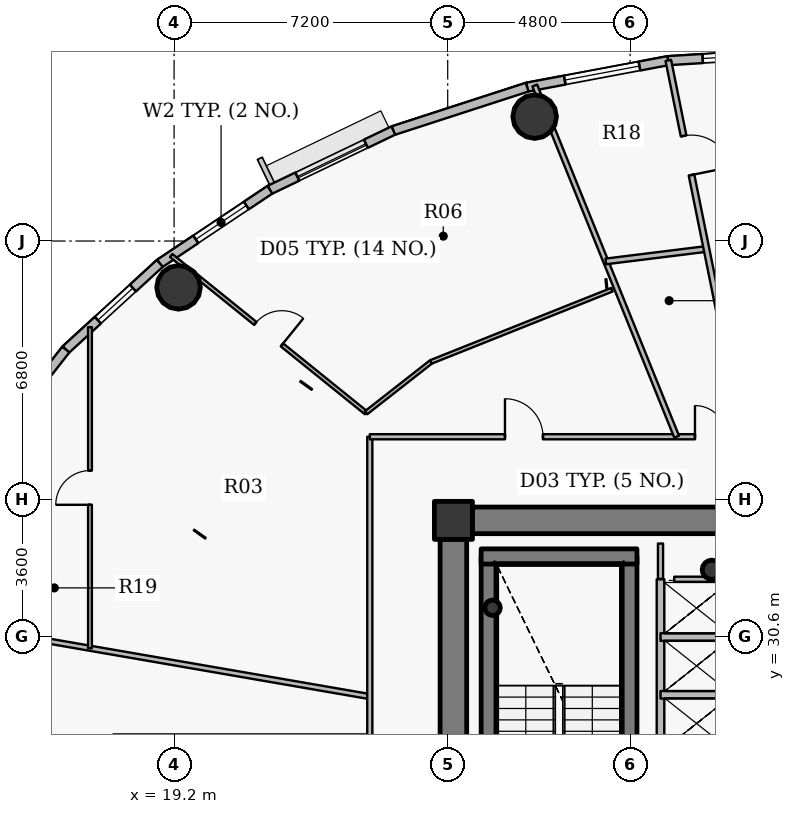
"""IFC4 building model, lengths in metres.
Left out: names, types, materials, properties, quantities, classifications, styles, units other than length and angle.
Written with IfcOpenShell. Run it as: python <this file> out.ifc"""

import sys

from ifc_helpers import new_model, si_unit, direction, frame, frame_2d, origin, origin_2d, place, context, subcontext, project, spatial, rectangle, hollow_circle, extrude, source, transform, mapped, element, fill, save


model = new_model("IFC4")
c1 = context("Model", 3, precision=1e-05, world=origin(), true_north=direction((0.0, 1.0)))
c2 = subcontext(c1, "Body", "Model", "MODEL_VIEW")
j1 = project(units=[si_unit("LENGTHUNIT", "METRE"), si_unit("PLANEANGLEUNIT", "RADIAN")], contexts=[c1])
p1 = place(None, origin())
s1 = spatial("IfcSite", under=j1, at=p1, CompositionType="ELEMENT")
p2 = place(p1, origin())
s2 = spatial("IfcBuilding", under=s1, at=p2, CompositionType="ELEMENT")
p3 = place(p2, frame((0.0, 0.0, 229.05)))
s3 = spatial("IfcBuildingStorey", under=s2, at=p3, CompositionType="ELEMENT", Elevation=229.05)
p4 = place(p3, frame((26.55, 33.65, 0.0), z_axis=(0.0, 0.0, 1.0), x_axis=(1.0, 0.0, 0.0)))
e1 = element("IfcColumn", 1, at=p4, inside=s3, PredefinedType="COLUMN", context=c2, shape_type="SweptSolid", body=[
    extrude(rectangle(XDim=1.0, YDim=1.0, at=origin_2d()), origin(), (0.0, 0.0, 1.0), 3.75),
])
p5 = place(p3, frame((33.35, 32.35, 0.0), z_axis=(0.0, 0.0, 1.0), x_axis=(1.0, 0.0, 0.0)))
e2 = element("IfcColumn", 2, at=p5, inside=s3, PredefinedType="COLUMN", context=c2, shape_type="SweptSolid", body=[
    extrude(hollow_circle(Radius=0.254, WallThickness=0.02, at=origin_2d()), origin(), (0.0, 0.0, 1.0), 3.75),
])
p6 = place(p3, frame((27.48, 24.1, 0.0), z_axis=(0.0, 0.0, 1.0), x_axis=(0.0, 1.0, 0.0)))
e3 = element("IfcWall", 3, at=p6, inside=s3, PredefinedType="SHEAR", context=c2, shape_type="SweptSolid", body=[
    extrude(rectangle(XDim=8.6, YDim=0.4, at=frame_2d((4.3, 0.0))), origin(), (0.0, 0.0, 1.0), 3.75),
])
p7 = place(p3, frame((31.18, 27.8, 0.0), z_axis=(0.0, 0.0, 1.0), x_axis=(0.0, 1.0, 0.0)))
e4 = element("IfcWall", 4, at=p7, inside=s3, PredefinedType="SHEAR", context=c2, shape_type="SweptSolid", body=[
    extrude(rectangle(XDim=4.9, YDim=0.4, at=frame_2d((2.45, 0.0))), origin(), (0.0, 0.0, 1.0), 3.75),
])
p8 = place(p3, frame((27.28, 32.7, 0.0), z_axis=(0.0, 0.0, 1.0), x_axis=(1.0, 0.0, 0.0)))
e5 = element("IfcWall", 5, at=p8, inside=s3, PredefinedType="SHEAR", context=c2, shape_type="SweptSolid", body=[
    extrude(rectangle(XDim=4.1, YDim=0.4, at=frame_2d((2.05, 0.0))), origin(), (0.0, 0.0, 1.0), 3.75),
])
p9 = place(p3, frame((27.58, 31.35, 0.0), z_axis=(0.0, 0.0, 1.0), x_axis=(1.0, 0.0, 0.0)))
e6 = element("IfcColumn", 6, at=p9, inside=s3, PredefinedType="COLUMN", context=c2, shape_type="SweptSolid", body=[
    extrude(hollow_circle(Radius=0.203, WallThickness=0.016, at=origin_2d()), origin(), (0.0, 0.0, 1.0), 3.75),
])
p10 = place(p3, frame((27.05, 33.65, 0.0), z_axis=(0.0, 0.0, 1.0), x_axis=(1.0, 0.0, 0.0)))
e7 = element("IfcWall", 7, at=p10, inside=s3, PredefinedType="SHEAR", context=c2, shape_type="SweptSolid", body=[
    extrude(rectangle(XDim=17.9, YDim=0.7, at=frame_2d((8.95, 0.0))), origin(), (0.0, 0.0, 1.0), 3.05),
])
p11 = place(p10, frame((13.675, 0.0, 0.0)))
e8 = element("IfcOpeningElement", 8, at=p11, cuts=e7, PredefinedType="OPENING", context=c2, shape_type="SweptSolid", body=[
    extrude(rectangle(XDim=1.15, YDim=2.15, at=origin_2d()), frame((0.575, 0.36, 1.075), z_axis=(0.0, -1.0, 0.0), x_axis=(1.0, 0.0, 0.0)), (0.0, 0.0, 1.0), 0.72),
])
p12 = place(p3, frame((26.55, 20.85, 0.0), z_axis=(0.0, 0.0, 1.0), x_axis=(0.0, 1.0, 0.0)))
e9 = element("IfcWall", 9, at=p12, inside=s3, PredefinedType="SHEAR", context=c2, shape_type="SweptSolid", body=[
    extrude(rectangle(XDim=12.3, YDim=0.7, at=frame_2d((6.15, 0.0))), origin(), (0.0, 0.0, 1.0), 3.05),
])
p13 = place(p12, frame((1.085, 0.0, 0.0)))
e10 = element("IfcOpeningElement", 10, at=p13, cuts=e9, PredefinedType="OPENING", context=c2, shape_type="SweptSolid", body=[
    extrude(rectangle(XDim=1.15, YDim=2.15, at=origin_2d()), frame((0.575, 0.36, 1.075), z_axis=(0.0, -1.0, 0.0), x_axis=(1.0, 0.0, 0.0)), (0.0, 0.0, 1.0), 0.72),
])
for number, where, z_axis, x_axis in (
    (11, (28.688, 44.273, 0.0), (0.0, 0.0, 1.0), (1.0, 0.0, 0.0)),
    (12, (19.317, 39.781, 0.0), (0.0, 0.0, 1.0), (1.0, 0.0, 0.0)),
):
    element("IfcColumn", number, at=place(p3, frame(where, z_axis=z_axis, x_axis=x_axis)), inside=s3, PredefinedType="COLUMN", context=c2, shape_type="SweptSolid", body=[
        extrude(hollow_circle(Radius=0.575, WallThickness=0.036, at=origin_2d()), origin(), (0.0, 0.0, 1.0), 3.75),
    ])
p14 = place(p3, frame((32.198, 45.746, 0.0), z_axis=(0.0, 0.0, 1.0), x_axis=(0.998108785312, 0.06147237333, 0.0)))
e13 = element("IfcWall", 13, at=p14, inside=s3, PredefinedType="SOLIDWALL", context=c2, shape_type="SweptSolid", body=[
    extrude(rectangle(XDim=3.809, YDim=0.24, at=frame_2d((1.904, 0.0))), origin(), (0.0, 0.0, 1.0), 3.5),
])
p15 = place(p14, frame((0.913, 0.0, 0.9)))
e14 = element("IfcOpeningElement", 14, at=p15, cuts=e13, PredefinedType="OPENING", context=c2, shape_type="SweptSolid", body=[
    extrude(rectangle(XDim=2.0, YDim=1.75, at=origin_2d()), frame((1.0, 0.13, 0.875), z_axis=(0.0, -1.0, 0.0), x_axis=(1.0, 0.0, 0.0)), (0.0, 0.0, 1.0), 0.26),
])
p16 = place(p3, frame((28.491, 45.049, 0.0), z_axis=(0.0, 0.0, 1.0), x_axis=(0.982784898575, 0.184753465822, 0.0)))
e15 = element("IfcWall", 15, at=p16, inside=s3, PredefinedType="SOLIDWALL", context=c2, shape_type="SweptSolid", body=[
    extrude(rectangle(XDim=3.773, YDim=0.24, at=frame_2d((1.886, 0.0))), origin(), (0.0, 0.0, 1.0), 3.5),
])
p17 = place(p16, frame((1.006, 0.0, 0.9)))
e16 = element("IfcOpeningElement", 16, at=p17, cuts=e15, PredefinedType="OPENING", context=c2, shape_type="SweptSolid", body=[
    extrude(rectangle(XDim=2.0, YDim=1.75, at=origin_2d()), frame((1.0, 0.13, 0.875), z_axis=(0.0, -1.0, 0.0), x_axis=(1.0, 0.0, 0.0)), (0.0, 0.0, 1.0), 0.26),
])
p18 = place(p3, frame((24.969, 43.906, 0.0), z_axis=(0.0, 0.0, 1.0), x_axis=(0.951210789182, 0.308541787354, 0.0)))
e17 = element("IfcWall", 17, at=p18, inside=s3, PredefinedType="SOLIDWALL", context=c2, shape_type="SweptSolid", body=[
    extrude(rectangle(XDim=3.702, YDim=0.24, at=frame_2d((1.851, 0.0))), origin(), (0.0, 0.0, 1.0), 3.5),
])
p19 = place(p3, frame((21.72, 42.348, 0.0), z_axis=(0.0, 0.0, 1.0), x_axis=(0.901598104751, 0.432574684313, 0.0)))
e18 = element("IfcWall", 18, at=p19, inside=s3, PredefinedType="SOLIDWALL", context=c2, shape_type="SweptSolid", body=[
    extrude(rectangle(XDim=3.604, YDim=0.24, at=frame_2d((1.802, 0.0))), origin(), (0.0, 0.0, 1.0), 3.5),
])
p20 = place(p19, frame((0.802, 0.0, 0.9)))
e19 = element("IfcOpeningElement", 19, at=p20, cuts=e18, PredefinedType="OPENING", context=c2, shape_type="SweptSolid", body=[
    extrude(rectangle(XDim=2.0, YDim=1.75, at=origin_2d()), frame((1.0, 0.13, 0.875), z_axis=(0.0, -1.0, 0.0), x_axis=(1.0, 0.0, 0.0)), (0.0, 0.0, 1.0), 0.26),
])
p21 = place(p3, frame((18.824, 40.411, 0.0), z_axis=(0.0, 0.0, 1.0), x_axis=(0.831262496074, 0.555880079352, 0.0)))
e20 = element("IfcWall", 20, at=p21, inside=s3, PredefinedType="SOLIDWALL", context=c2, shape_type="SweptSolid", body=[
    extrude(rectangle(XDim=3.484, YDim=0.24, at=frame_2d((1.742, 0.0))), origin(), (0.0, 0.0, 1.0), 3.5),
])
p22 = place(p21, frame((1.14, 0.0, 0.9)))
e21 = element("IfcOpeningElement", 21, at=p22, cuts=e20, PredefinedType="OPENING", context=c2, shape_type="SweptSolid", body=[
    extrude(rectangle(XDim=1.6, YDim=1.75, at=origin_2d()), frame((0.8, 0.13, 0.875), z_axis=(0.0, -1.0, 0.0), x_axis=(1.0, 0.0, 0.0)), (0.0, 0.0, 1.0), 0.26),
])
p23 = place(p3, frame((16.352, 38.145, 0.0), z_axis=(0.0, 0.0, 1.0), x_axis=(0.737123922599, 0.675757591694, 0.0)))
e22 = element("IfcWall", 22, at=p23, inside=s3, PredefinedType="SOLIDWALL", context=c2, shape_type="SweptSolid", body=[
    extrude(rectangle(XDim=3.354, YDim=0.24, at=frame_2d((1.677, 0.0))), origin(), (0.0, 0.0, 1.0), 3.5),
])
p24 = place(p23, frame((1.144, 0.0, 0.9)))
e23 = element("IfcOpeningElement", 23, at=p24, cuts=e22, PredefinedType="OPENING", context=c2, shape_type="SweptSolid", body=[
    extrude(rectangle(XDim=1.25, YDim=1.65, at=origin_2d()), frame((0.625, 0.13, 0.825), z_axis=(0.0, -1.0, 0.0), x_axis=(1.0, 0.0, 0.0)), (0.0, 0.0, 1.0), 0.26),
])
p25 = place(p3, frame((14.364, 35.605, 0.0), z_axis=(0.0, 0.0, 1.0), x_axis=(0.616312344705, 0.787501805562, 0.0)))
e24 = element("IfcWall", 24, at=p25, inside=s3, PredefinedType="SOLIDWALL", context=c2, shape_type="SweptSolid", body=[
    extrude(rectangle(XDim=3.225, YDim=0.24, at=frame_2d((1.612, 0.0))), origin(), (0.0, 0.0, 1.0), 3.5),
])
p26 = place(p3, frame((12.361, 31.084, 0.0), z_axis=(0.0, 0.0, 1.0), x_axis=(0.98539748391, -0.17026978212, 0.0)))
e25 = element("IfcWall", 25, at=p26, inside=s3, PredefinedType="PARTITIONING", context=c2, shape_type="SweptSolid", body=[
    extrude(rectangle(XDim=12.166, YDim=0.135, at=frame_2d((6.083, 0.0))), origin(), (0.0, 0.0, 1.0), 2.985),
])
p27 = place(p3, frame((16.987, 30.285, 0.0), z_axis=(0.0, 0.0, 1.0), x_axis=(0.0, 1.0, 0.0)))
e26 = element("IfcWall", 26, at=p27, inside=s3, PredefinedType="PARTITIONING", context=c2, shape_type="SweptSolid", body=[
    extrude(rectangle(XDim=8.449, YDim=0.1, at=frame_2d((4.224, 0.0))), origin(), (0.0, 0.0, 1.0), 2.935),
])
p28 = place(p27, frame((3.774, 0.0, 0.0)))
e27 = element("IfcOpeningElement", 27, at=p28, cuts=e26, PredefinedType="OPENING", context=c2, shape_type="SweptSolid", body=[
    extrude(rectangle(XDim=0.9, YDim=2.1, at=origin_2d()), frame((0.45, 0.06, 1.05), z_axis=(0.0, -1.0, 0.0), x_axis=(1.0, 0.0, 0.0)), (0.0, 0.0, 1.0), 0.12),
])
p29 = place(p3, frame((17.6, 27.95, 0.0), z_axis=(0.0, 0.0, 1.0), x_axis=(1.0, 0.0, 0.0)))
e28 = element("IfcWall", 28, at=p29, inside=s3, PredefinedType="PARTITIONING", context=c2, shape_type="SweptSolid", body=[
    extrude(rectangle(XDim=6.75, YDim=0.135, at=frame_2d((3.375, 0.0))), origin(), (0.0, 0.0, 1.0), 3.5),
])
p30 = place(p3, frame((19.124, 40.618, 0.0), z_axis=(0.0, 0.0, 1.0), x_axis=(0.778207956818, -0.62800666871, 0.0)))
e29 = element("IfcWall", 29, at=p30, inside=s3, PredefinedType="PARTITIONING", context=c2, shape_type="SweptSolid", body=[
    extrude(rectangle(XDim=6.588, YDim=0.1, at=frame_2d((3.294, 0.0))), origin(), (0.0, 0.0, 1.0), 2.985),
])
p31 = place(p30, frame((2.844, 0.0, 0.0)))
e30 = element("IfcOpeningElement", 30, at=p31, cuts=e29, PredefinedType="OPENING", context=c2, shape_type="SweptSolid", body=[
    extrude(rectangle(XDim=0.9, YDim=2.1, at=origin_2d()), frame((0.45, 0.06, 1.05), z_axis=(0.0, -1.0, 0.0), x_axis=(1.0, 0.0, 0.0)), (0.0, 0.0, 1.0), 0.12),
])
p32 = place(p3, frame((24.251, 36.481, 0.0), z_axis=(0.0, 0.0, 1.0), x_axis=(0.787374491509, 0.616474987426, 0.0)))
e31 = element("IfcWall", 31, at=p32, inside=s3, PredefinedType="PARTITIONING", context=c2, shape_type="SweptSolid", body=[
    extrude(rectangle(XDim=2.171, YDim=0.1, at=frame_2d((1.086, 0.0))), origin(), (0.0, 0.0, 1.0), 3.5),
])
p33 = place(p3, frame((24.35, 27.95, 0.0), z_axis=(0.0, 0.0, 1.0), x_axis=(0.0, 1.0, 0.0)))
e32 = element("IfcWall", 32, at=p33, inside=s3, PredefinedType="PARTITIONING", context=c2, shape_type="SweptSolid", body=[
    extrude(rectangle(XDim=7.9, YDim=0.135, at=frame_2d((3.95, 0.0))), origin(), (0.0, 0.0, 1.0), 2.935),
])
p34 = place(p3, frame((24.35, 35.85, 0.0), z_axis=(0.0, 0.0, 1.0), x_axis=(1.0, 0.0, 0.0)))
e33 = element("IfcWall", 33, at=p34, inside=s3, PredefinedType="PARTITIONING", context=c2, shape_type="SweptSolid", body=[
    extrude(rectangle(XDim=26.218, YDim=0.135, at=frame_2d((13.109, 0.0))), origin(), (0.0, 0.0, 1.0), 2.935),
])
p35 = place(p34, frame((3.557, 0.0, 0.0)))
e34 = element("IfcOpeningElement", 34, at=p35, cuts=e33, PredefinedType="OPENING", context=c2, shape_type="SweptSolid", body=[
    extrude(rectangle(XDim=1.0, YDim=2.15, at=origin_2d()), frame((0.5, 0.078, 1.075), z_axis=(0.0, -1.0, 0.0), x_axis=(1.0, 0.0, 0.0)), (0.0, 0.0, 1.0), 0.155),
])
p36 = place(p34, frame((22.776, 0.0, 0.0)))
e35 = element("IfcOpeningElement", 35, at=p36, cuts=e33, PredefinedType="OPENING", context=c2, shape_type="SweptSolid", body=[
    extrude(rectangle(XDim=1.0, YDim=2.15, at=origin_2d()), frame((0.5, 0.078, 1.075), z_axis=(0.0, -1.0, 0.0), x_axis=(1.0, 0.0, 0.0)), (0.0, 0.0, 1.0), 0.155),
])
p37 = place(p34, frame((13.736, 0.0, 0.0)))
e36 = element("IfcOpeningElement", 36, at=p37, cuts=e33, PredefinedType="OPENING", context=c2, shape_type="SweptSolid", body=[
    extrude(rectangle(XDim=1.05, YDim=2.15, at=origin_2d()), frame((0.525, 0.078, 1.075), z_axis=(0.0, -1.0, 0.0), x_axis=(1.0, 0.0, 0.0)), (0.0, 0.0, 1.0), 0.155),
])
p38 = place(p34, frame((10.682, 0.0, 0.0)))
e37 = element("IfcOpeningElement", 37, at=p38, cuts=e33, PredefinedType="OPENING", context=c2, shape_type="SweptSolid", body=[
    extrude(rectangle(XDim=1.05, YDim=2.15, at=origin_2d()), frame((0.525, 0.078, 1.075), z_axis=(0.0, -1.0, 0.0), x_axis=(1.0, 0.0, 0.0)), (0.0, 0.0, 1.0), 0.155),
])
p39 = place(p34, frame((8.557, 0.0, 0.0)))
e38 = element("IfcOpeningElement", 38, at=p39, cuts=e33, PredefinedType="OPENING", context=c2, shape_type="SweptSolid", body=[
    extrude(rectangle(XDim=0.82, YDim=2.1, at=origin_2d()), frame((0.41, 0.078, 1.05), z_axis=(0.0, -1.0, 0.0), x_axis=(1.0, 0.0, 0.0)), (0.0, 0.0, 1.0), 0.155),
])
p40 = place(p3, frame((25.961, 37.819, 0.0), z_axis=(0.0, 0.0, 1.0), x_axis=(0.928801505367, 0.370577608105, 0.0)))
e39 = element("IfcWall", 39, at=p40, inside=s3, PredefinedType="PARTITIONING", context=c2, shape_type="SweptSolid", body=[
    extrude(rectangle(XDim=5.126, YDim=0.1, at=frame_2d((2.563, 0.0))), origin(), (0.0, 0.0, 1.0), 2.935),
])
p41 = place(p3, frame((28.691, 45.091, 0.0), z_axis=(0.0, 0.0, 1.0), x_axis=(0.37459385956, -0.927188999277, 0.0)))
e40 = element("IfcWall", 40, at=p41, inside=s3, PredefinedType="PARTITIONING", context=c2, shape_type="SweptSolid", body=[
    extrude(rectangle(XDim=9.967, YDim=0.135, at=frame_2d((4.984, 0.0))), origin(), (0.0, 0.0, 1.0), 2.935),
])
p42 = place(p3, frame((30.561, 40.463, 0.0), z_axis=(0.0, 0.0, 1.0), x_axis=(0.992402619978, 0.123032678023, 0.0)))
e41 = element("IfcWall", 41, at=p42, inside=s3, PredefinedType="PARTITIONING", context=c2, shape_type="SweptSolid", body=[
    extrude(rectangle(XDim=2.669, YDim=0.15, at=frame_2d((1.334, 0.0))), origin(), (0.0, 0.0, 1.0), 3.5),
])
p43 = place(p3, frame((32.0, 24.1, 0.0), z_axis=(0.0, 0.0, 1.0), x_axis=(0.0, 1.0, 0.0)))
e42 = element("IfcWall", 42, at=p43, inside=s3, PredefinedType="PARTITIONING", context=c2, shape_type="SweptSolid", body=[
    extrude(rectangle(XDim=8.0, YDim=0.2, at=frame_2d((4.0, 0.0))), origin(), (0.0, 0.0, 1.0), 3.5),
])
for number, where, z_axis, x_axis in (
    (43, (32.0, 29.06, 0.0), (0.0, 0.0, 1.0), (1.0, 0.0, 0.0)),
    (44, (32.0, 30.58, 0.0), (0.0, 0.0, 1.0), (1.0, 0.0, 0.0)),
):
    element("IfcWall", number, at=place(p3, frame(where, z_axis=z_axis, x_axis=x_axis)), inside=s3, PredefinedType="PARTITIONING", context=c2, shape_type="SweptSolid", body=[
        extrude(rectangle(XDim=1.9, YDim=0.2, at=frame_2d((0.95, 0.0))), origin(), (0.0, 0.0, 1.0), 3.085),
    ])
p44 = place(p3, frame((32.206, 45.751, 0.0), z_axis=(0.0, 0.0, 1.0), x_axis=(0.198323299654, -0.980136658234, 0.0)))
e45 = element("IfcWall", 45, at=p44, inside=s3, PredefinedType="PARTITIONING", context=c2, shape_type="SweptSolid", body=[
    extrude(rectangle(XDim=10.102, YDim=0.15, at=frame_2d((5.051, 0.0))), origin(), (0.0, 0.0, 1.0), 2.985),
])
p45 = place(p44, frame((2.025, 0.0, 0.0)))
e46 = element("IfcOpeningElement", 46, at=p45, cuts=e45, PredefinedType="OPENING", context=c2, shape_type="SweptSolid", body=[
    extrude(rectangle(XDim=1.05, YDim=2.15, at=origin_2d()), frame((0.525, 0.085, 1.075), z_axis=(0.0, -1.0, 0.0), x_axis=(1.0, 0.0, 0.0)), (0.0, 0.0, 1.0), 0.17),
])
p46 = place(p3, frame((32.36, 32.1, 0.0), z_axis=(0.0, 0.0, 1.0), x_axis=(1.0, 0.0, 0.0)))
e47 = element("IfcWall", 47, at=p46, inside=s3, PredefinedType="PARTITIONING", context=c2, shape_type="SweptSolid", body=[
    extrude(rectangle(XDim=1.18, YDim=0.135, at=frame_2d((0.59, 0.0))), origin(), (0.0, 0.0, 1.0), 3.085),
])
p47 = place(p3, frame((32.0, 33.04, 0.0), z_axis=(0.0, 0.0, 1.0), x_axis=(0.0, -1.0, 0.0)))
e48 = element("IfcWall", 48, at=p47, inside=s3, PredefinedType="PARTITIONING", context=c2, shape_type="SweptSolid", body=[
    extrude(rectangle(XDim=0.93, YDim=0.135, at=frame_2d((0.465, 0.0))), origin(), (0.0, 0.0, 1.0), 3.035),
])
p48 = place(p3, frame((27.04, 34.0, 0.0), z_axis=(0.0, 0.0, 1.0), x_axis=(-1.0, 0.0, 0.0)))
e49 = element("IfcWall", 49, at=p48, inside=s3, PredefinedType="PARTITIONING", context=c2, shape_type="SweptSolid", body=[
    extrude(rectangle(XDim=0.84, YDim=0.135, at=frame_2d((0.42, 0.0))), origin(), (0.0, 0.0, 1.0), 2.935),
])
p49 = place(p3, frame((26.2, 33.692, 0.0), z_axis=(0.0, 0.0, 1.0), x_axis=(0.0, -1.0, 0.0)))
e50 = element("IfcWall", 50, at=p49, inside=s3, PredefinedType="PARTITIONING", context=c2, shape_type="SweptSolid", body=[
    extrude(rectangle(XDim=0.532, YDim=0.135, at=frame_2d((0.266, 0.0))), origin(), (0.0, 0.0, 1.0), 3.5),
])
m1 = source(origin(), c2, "Body", "SweptSolid", [
    extrude(rectangle(XDim=2.0, YDim=1.75, at=origin_2d()), frame((1.0, 0.03, 0.875), z_axis=(0.0, -1.0, 0.0), x_axis=(1.0, 0.0, 0.0)), (0.0, 0.0, 1.0), 0.06),
])
p50 = place(p15, origin())
e51 = element("IfcWindow", 51, at=p50, inside=s3, PartitioningType="DOUBLE_PANEL_VERTICAL", PredefinedType="WINDOW", context=c2, shape_type="MappedRepresentation", body=[
    mapped(m1, transform((0.0, 0.0, 0.0), x_axis=(1.0, 0.0, 0.0), y_axis=(0.0, 1.0, 0.0), z_axis=(0.0, 0.0, 1.0), scale=1.0)),
])
fill(e14, e51)
p51 = place(p17, origin())
e52 = element("IfcWindow", 52, at=p51, inside=s3, PartitioningType="DOUBLE_PANEL_VERTICAL", PredefinedType="WINDOW", context=c2, shape_type="MappedRepresentation", body=[
    mapped(m1, transform((0.0, 0.0, 0.0), x_axis=(1.0, 0.0, 0.0), y_axis=(0.0, 1.0, 0.0), z_axis=(0.0, 0.0, 1.0), scale=1.0)),
])
fill(e16, e52)
p52 = place(p20, origin())
e53 = element("IfcWindow", 53, at=p52, inside=s3, PartitioningType="DOUBLE_PANEL_VERTICAL", PredefinedType="WINDOW", context=c2, shape_type="MappedRepresentation", body=[
    mapped(m1, transform((0.0, 0.0, 0.0), x_axis=(1.0, 0.0, 0.0), y_axis=(0.0, 1.0, 0.0), z_axis=(0.0, 0.0, 1.0), scale=1.0)),
])
fill(e19, e53)
m2 = source(origin(), c2, "Body", "SweptSolid", [
    extrude(rectangle(XDim=1.6, YDim=1.75, at=origin_2d()), frame((0.8, 0.03, 0.875), z_axis=(0.0, -1.0, 0.0), x_axis=(1.0, 0.0, 0.0)), (0.0, 0.0, 1.0), 0.06),
])
p53 = place(p22, origin())
e54 = element("IfcWindow", 54, at=p53, inside=s3, PartitioningType="DOUBLE_PANEL_VERTICAL", PredefinedType="WINDOW", context=c2, shape_type="MappedRepresentation", body=[
    mapped(m2, transform((0.0, 0.0, 0.0), x_axis=(1.0, 0.0, 0.0), y_axis=(0.0, 1.0, 0.0), z_axis=(0.0, 0.0, 1.0), scale=1.0)),
])
fill(e21, e54)
m3 = source(origin(), c2, "Body", "SweptSolid", [
    extrude(rectangle(XDim=1.25, YDim=1.65, at=origin_2d()), frame((0.625, 0.03, 0.825), z_axis=(0.0, -1.0, 0.0), x_axis=(1.0, 0.0, 0.0)), (0.0, 0.0, 1.0), 0.06),
])
p54 = place(p24, origin())
e55 = element("IfcWindow", 55, at=p54, inside=s3, PartitioningType="SINGLE_PANEL", PredefinedType="WINDOW", context=c2, shape_type="MappedRepresentation", body=[
    mapped(m3, transform((0.0, 0.0, 0.0), x_axis=(1.0, 0.0, 0.0), y_axis=(0.0, 1.0, 0.0), z_axis=(0.0, 0.0, 1.0), scale=1.0)),
])
fill(e23, e55)
m4 = source(origin(), c2, "Body", "SweptSolid", [
    extrude(rectangle(XDim=1.0, YDim=2.15, at=origin_2d()), frame((0.5, 0.025, 1.075), z_axis=(0.0, -1.0, 0.0), x_axis=(1.0, 0.0, 0.0)), (0.0, 0.0, 1.0), 0.05),
])
p55 = place(p35, origin())
e56 = element("IfcDoor", 56, at=p55, inside=s3, OperationType="SINGLE_SWING_LEFT", PredefinedType="DOOR", context=c2, shape_type="MappedRepresentation", body=[
    mapped(m4, transform((0.0, 0.0, 0.0), x_axis=(1.0, 0.0, 0.0), y_axis=(0.0, 1.0, 0.0), z_axis=(0.0, 0.0, 1.0), scale=1.0)),
])
fill(e34, e56)
m5 = source(origin(), c2, "Body", "SweptSolid", [
    extrude(rectangle(XDim=0.9, YDim=2.1, at=origin_2d()), frame((0.45, 0.025, 1.05), z_axis=(0.0, -1.0, 0.0), x_axis=(1.0, 0.0, 0.0)), (0.0, 0.0, 1.0), 0.05),
])
p56 = place(p31, origin())
e57 = element("IfcDoor", 57, at=p56, inside=s3, OperationType="SINGLE_SWING_RIGHT", PredefinedType="DOOR", context=c2, shape_type="MappedRepresentation", body=[
    mapped(m5, transform((0.0, 0.0, 0.0), x_axis=(1.0, 0.0, 0.0), y_axis=(0.0, 1.0, 0.0), z_axis=(0.0, 0.0, 1.0), scale=1.0)),
])
fill(e30, e57)
p57 = place(p28, origin())
e58 = element("IfcDoor", 58, at=p57, inside=s3, OperationType="SINGLE_SWING_LEFT", PredefinedType="DOOR", context=c2, shape_type="MappedRepresentation", body=[
    mapped(m5, transform((0.0, 0.0, 0.0), x_axis=(1.0, 0.0, 0.0), y_axis=(0.0, 1.0, 0.0), z_axis=(0.0, 0.0, 1.0), scale=1.0)),
])
fill(e27, e58)
m6 = source(origin(), c2, "Body", "SweptSolid", [
    extrude(rectangle(XDim=0.82, YDim=2.1, at=origin_2d()), frame((0.41, 0.025, 1.05), z_axis=(0.0, -1.0, 0.0), x_axis=(1.0, 0.0, 0.0)), (0.0, 0.0, 1.0), 0.05),
])
p58 = place(p39, origin())
e59 = element("IfcDoor", 59, at=p58, inside=s3, OperationType="SINGLE_SWING_LEFT", PredefinedType="DOOR", context=c2, shape_type="MappedRepresentation", body=[
    mapped(m6, transform((0.0, 0.0, 0.0), x_axis=(1.0, 0.0, 0.0), y_axis=(0.0, 1.0, 0.0), z_axis=(0.0, 0.0, 1.0), scale=1.0)),
])
fill(e38, e59)
m7 = source(origin(), c2, "Body", "SweptSolid", [
    extrude(rectangle(XDim=1.05, YDim=2.15, at=origin_2d()), frame((0.525, 0.025, 1.075), z_axis=(0.0, -1.0, 0.0), x_axis=(1.0, 0.0, 0.0)), (0.0, 0.0, 1.0), 0.05),
])
p59 = place(p45, origin())
e60 = element("IfcDoor", 60, at=p59, inside=s3, OperationType="SINGLE_SWING_RIGHT", PredefinedType="DOOR", context=c2, shape_type="MappedRepresentation", body=[
    mapped(m7, transform((0.0, 0.0, 0.0), x_axis=(1.0, 0.0, 0.0), y_axis=(0.0, 1.0, 0.0), z_axis=(0.0, 0.0, 1.0), scale=1.0)),
])
fill(e46, e60)
save(model, sys.argv[1])
